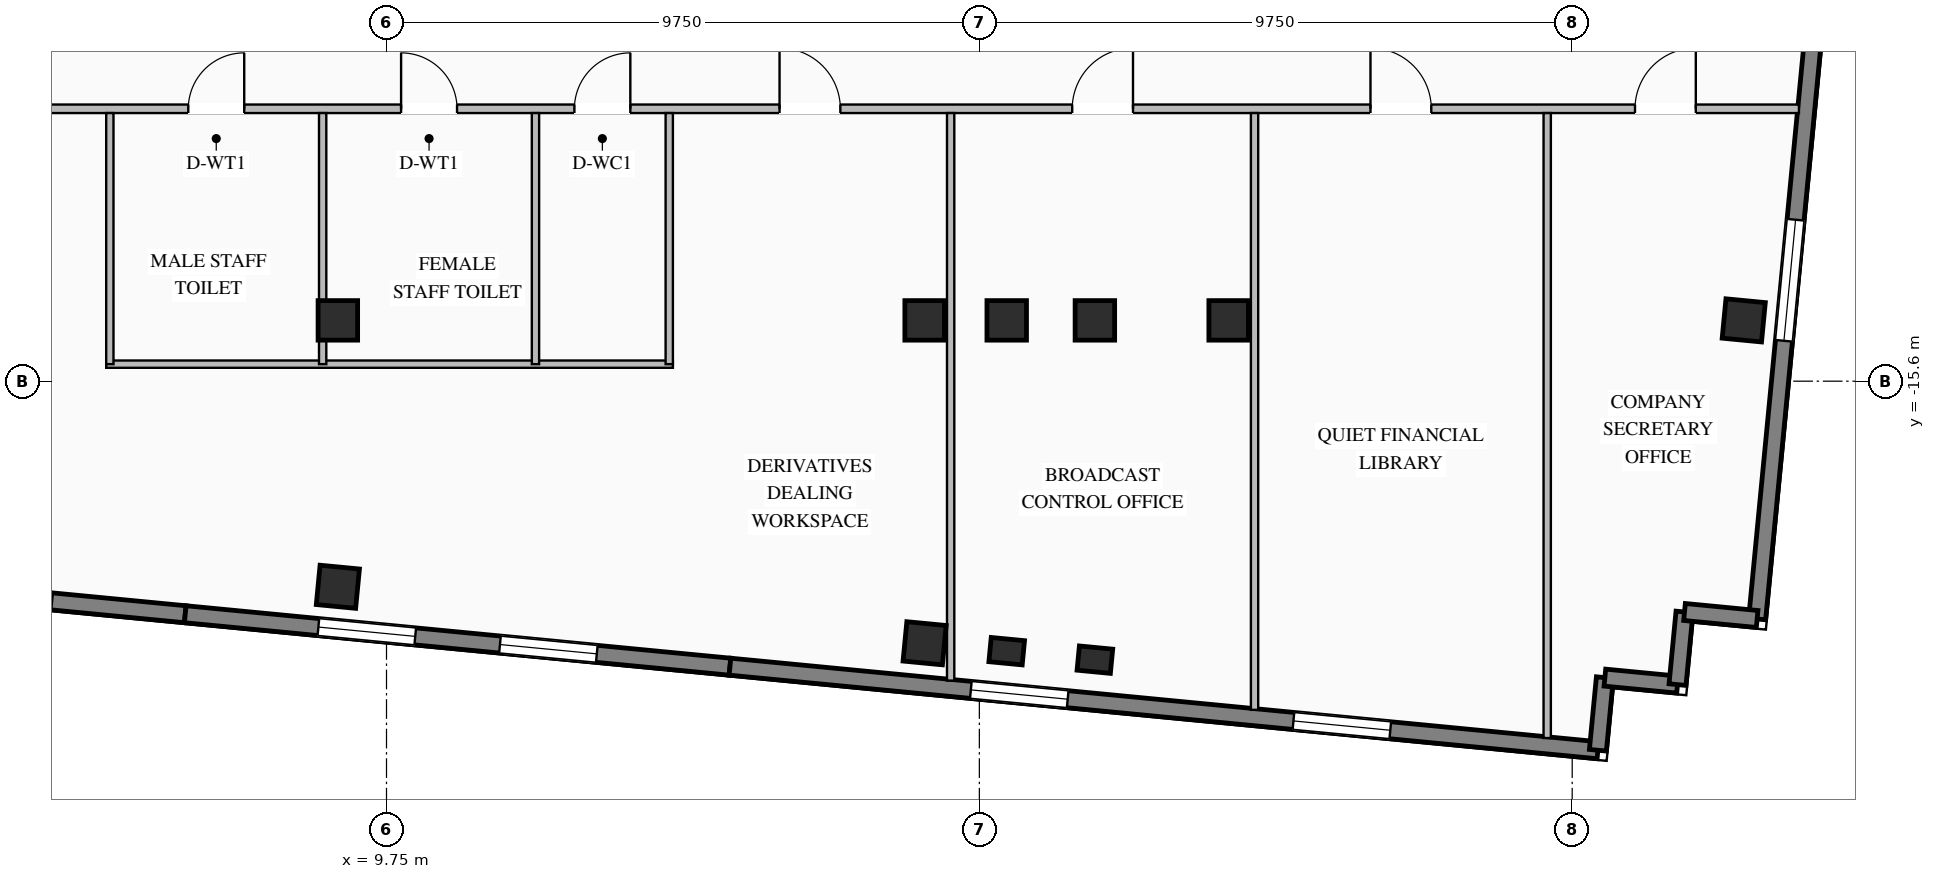
"""IFC4 building model, lengths in metres.
Left out: names, types, materials, properties, quantities, classifications, styles, units other than length and angle.
Written with IfcOpenShell. Run it as: python <this file> out.ifc"""

import sys

from ifc_helpers import new_model, si_unit, direction, frame, frame_2d, origin, origin_2d, place, context, subcontext, project, spatial, rectangle, i_section, extrude, element, fill, save


model = new_model("IFC4")
c1 = context("Model", 3, precision=1e-05, world=origin(), true_north=direction((0.0, 1.0)))
c2 = subcontext(c1, "Body", "Model", "MODEL_VIEW")
j1 = project(units=[si_unit("LENGTHUNIT", "METRE"), si_unit("PLANEANGLEUNIT", "RADIAN")], contexts=[c1])
p1 = place(None, origin())
s1 = spatial("IfcSite", under=j1, at=p1, CompositionType="ELEMENT")
p2 = place(p1, origin())
s2 = spatial("IfcBuilding", under=s1, at=p2, CompositionType="ELEMENT")
p3 = place(p2, frame((0.0, 0.0, 170.75)))
s3 = spatial("IfcBuildingStorey", under=s2, at=p3, CompositionType="ELEMENT", Elevation=170.75)
for number, where, z_axis, x_axis in (
    (1, (8.95, -14.6, 0.0), (0.0, 0.0, 1.0), (1.0, 0.0, 0.0)),
    (2, (18.6, -14.6, 0.0), (0.0, 0.0, 1.0), (1.0, 0.0, 0.0)),
    (3, (19.95, -14.6, 0.0), (0.0, 0.0, 1.0), (1.0, 0.0, 0.0)),
    (4, (21.4, -14.6, 0.0), (0.0, 0.0, 1.0), (1.0, 0.0, 0.0)),
    (5, (23.6, -14.6, 0.0), (0.0, 0.0, 1.0), (1.0, 0.0, 0.0)),
    (6, (8.95, -18.981, 0.0), (0.0, 0.0, 1.0), (0.995, -0.096, 0.0)),
    (7, (18.6, -19.911, 0.0), (0.0, 0.0, 1.0), (0.995, -0.096, 0.0)),
    (8, (32.071, -14.6, 0.0), (0.0, 0.0, 1.0), (0.995, -0.096, 0.0)),
):
    element("IfcColumn", number, at=place(p3, frame(where, z_axis=z_axis, x_axis=x_axis)), inside=s3, PredefinedType="COLUMN", context=c2, shape_type="SweptSolid", body=[
        extrude(i_section(OverallWidth=0.65, OverallDepth=0.65, WebThickness=0.028, FlangeThickness=0.04, at=origin_2d()), origin(), (0.0, 0.0, 1.0), 3.45),
    ])
for number, where, z_axis, x_axis in (
    (9, (19.95, -20.041, 0.0), (0.0, 0.0, 1.0), (0.995, -0.096, 0.0)),
    (10, (21.4, -20.18, 0.0), (0.0, 0.0, 1.0), (0.995, -0.096, 0.0)),
):
    element("IfcColumn", number, at=place(p3, frame(where, z_axis=z_axis, x_axis=x_axis)), inside=s3, PredefinedType="PILASTER", context=c2, shape_type="SweptSolid", body=[
        extrude(rectangle(XDim=0.55, YDim=0.4, at=origin_2d()), origin(), (0.0, 0.0, 1.0), 3.45),
    ])
p4 = place(p3, frame((6.44, -19.433, 0.0), z_axis=(0.0, 0.0, 1.0), x_axis=(-0.995396794462, 0.09583956164, 0.0)))
e11 = element("IfcWall", 11, at=p4, inside=s3, PredefinedType="STANDARD", context=c2, shape_type="SweptSolid", body=[
    extrude(rectangle(XDim=9.0, YDim=0.28, at=frame_2d((4.5, 0.0))), origin(), (0.0, 0.0, 1.0), 3.25),
])
p5 = place(p4, frame((2.2, 0.0, 0.76)))
e12 = element("IfcOpeningElement", 12, at=p5, cuts=e11, PredefinedType="OPENING", context=c2, shape_type="SweptSolid", body=[
    extrude(rectangle(XDim=1.6, YDim=1.95, at=frame_2d((0.8, 0.975))), frame((0.0, 0.15, 0.0), z_axis=(0.0, -1.0, 0.0), x_axis=(1.0, 0.0, 0.0)), (0.0, 0.0, 1.0), 0.3),
])
p6 = place(p4, frame((5.2, 0.0, 0.76)))
e13 = element("IfcOpeningElement", 13, at=p6, cuts=e11, PredefinedType="OPENING", context=c2, shape_type="SweptSolid", body=[
    extrude(rectangle(XDim=1.6, YDim=1.95, at=frame_2d((0.8, 0.975))), frame((0.0, 0.15, 0.0), z_axis=(0.0, -1.0, 0.0), x_axis=(1.0, 0.0, 0.0)), (0.0, 0.0, 1.0), 0.3),
])
p7 = place(p3, frame((15.399, -20.296, 0.0), z_axis=(0.0, 0.0, 1.0), x_axis=(-0.995394455533, 0.09586385082, 0.0)))
e14 = element("IfcWall", 14, at=p7, inside=s3, PredefinedType="STANDARD", context=c2, shape_type="SweptSolid", body=[
    extrude(rectangle(XDim=9.0, YDim=0.28, at=frame_2d((4.5, 0.0))), origin(), (0.0, 0.0, 1.0), 3.25),
])
p8 = place(p7, frame((2.2, 0.0, 0.76)))
e15 = element("IfcOpeningElement", 15, at=p8, cuts=e14, PredefinedType="OPENING", context=c2, shape_type="SweptSolid", body=[
    extrude(rectangle(XDim=1.6, YDim=1.95, at=frame_2d((0.8, 0.975))), frame((0.0, 0.15, 0.0), z_axis=(0.0, -1.0, 0.0), x_axis=(1.0, 0.0, 0.0)), (0.0, 0.0, 1.0), 0.3),
])
p9 = place(p7, frame((5.2, 0.0, 0.76)))
e16 = element("IfcOpeningElement", 16, at=p9, cuts=e14, PredefinedType="OPENING", context=c2, shape_type="SweptSolid", body=[
    extrude(rectangle(XDim=1.6, YDim=1.95, at=frame_2d((0.8, 0.975))), frame((0.0, 0.15, 0.0), z_axis=(0.0, -1.0, 0.0), x_axis=(1.0, 0.0, 0.0)), (0.0, 0.0, 1.0), 0.3),
])
p10 = place(p3, frame((29.673, -21.67, 0.0), z_axis=(0.0, 0.0, 1.0), x_axis=(-0.995397230529, 0.095835032509, 0.0)))
e17 = element("IfcWall", 17, at=p10, inside=s3, PredefinedType="STANDARD", context=c2, shape_type="SweptSolid", body=[
    extrude(rectangle(XDim=14.34, YDim=0.28, at=frame_2d((7.17, 0.0))), origin(), (0.0, 0.0, 1.0), 3.25),
])
p11 = place(p10, frame((3.43, 0.0, 0.76)))
e18 = element("IfcOpeningElement", 18, at=p11, cuts=e17, PredefinedType="OPENING", context=c2, shape_type="SweptSolid", body=[
    extrude(rectangle(XDim=1.6, YDim=1.95, at=frame_2d((0.8, 0.975))), frame((0.0, 0.15, 0.0), z_axis=(0.0, -1.0, 0.0), x_axis=(1.0, 0.0, 0.0)), (0.0, 0.0, 1.0), 0.3),
])
p12 = place(p10, frame((8.76, 0.0, 0.76)))
e19 = element("IfcOpeningElement", 19, at=p12, cuts=e17, PredefinedType="OPENING", context=c2, shape_type="SweptSolid", body=[
    extrude(rectangle(XDim=1.6, YDim=1.95, at=frame_2d((0.8, 0.975))), frame((0.0, 0.15, 0.0), z_axis=(0.0, -1.0, 0.0), x_axis=(1.0, 0.0, 0.0)), (0.0, 0.0, 1.0), 0.3),
])
p13 = place(p3, frame((33.901, -2.798, 0.0), z_axis=(0.0, 0.0, 1.0), x_axis=(-0.095853434568, -0.99539545864, 0.0)))
e20 = element("IfcWall", 20, at=p13, inside=s3, PredefinedType="STANDARD", context=c2, shape_type="SweptSolid", body=[
    extrude(rectangle(XDim=16.79, YDim=0.28, at=frame_2d((8.395, 0.0))), origin(), (0.0, 0.0, 1.0), 3.25),
])
p14 = place(p13, frame((3.547, 0.0, 0.76)))
e21 = element("IfcOpeningElement", 21, at=p14, cuts=e20, PredefinedType="OPENING", context=c2, shape_type="SweptSolid", body=[
    extrude(rectangle(XDim=2.0, YDim=2.05, at=frame_2d((1.0, 1.025))), frame((0.0, 0.15, 0.0), z_axis=(0.0, -1.0, 0.0), x_axis=(1.0, 0.0, 0.0)), (0.0, 0.0, 1.0), 0.3),
])
p15 = place(p13, frame((10.193, 0.0, 0.76)))
e22 = element("IfcOpeningElement", 22, at=p15, cuts=e20, PredefinedType="OPENING", context=c2, shape_type="SweptSolid", body=[
    extrude(rectangle(XDim=2.0, YDim=2.05, at=frame_2d((1.0, 1.025))), frame((0.0, 0.15, 0.0), z_axis=(0.0, -1.0, 0.0), x_axis=(1.0, 0.0, 0.0)), (0.0, 0.0, 1.0), 0.3),
])
for number, where, z_axis, x_axis in (
    (23, (29.673, -21.67, 0.0), (0.0, 0.0, 1.0), (0.096, 0.995, 0.0)),
    (24, (29.788, -20.476, 0.0), (0.0, 0.0, 1.0), (0.995, -0.096, 0.0)),
):
    element("IfcWall", number, at=place(p3, frame(where, z_axis=z_axis, x_axis=x_axis)), inside=s3, PredefinedType="STANDARD", context=c2, shape_type="SweptSolid", body=[
        extrude(rectangle(XDim=1.2, YDim=0.28, at=frame_2d((0.6, 0.0))), origin(), (0.0, 0.0, 1.0), 3.25),
    ])
p16 = place(p3, frame((30.982, -20.591, 0.0), z_axis=(0.0, 0.0, 1.0), x_axis=(0.096018626938, 0.995379537303, 0.0)))
e25 = element("IfcWall", 25, at=p16, inside=s3, PredefinedType="STANDARD", context=c2, shape_type="SweptSolid", body=[
    extrude(rectangle(XDim=1.2, YDim=0.28, at=frame_2d((0.6, 0.0))), origin(), (0.0, 0.0, 1.0), 3.25),
])
p17 = place(p3, frame((31.097, -19.396, 0.0), z_axis=(0.0, 0.0, 1.0), x_axis=(0.995397091755, -0.095836473879, 0.0)))
e26 = element("IfcWall", 26, at=p17, inside=s3, PredefinedType="STANDARD", context=c2, shape_type="SweptSolid", body=[
    extrude(rectangle(XDim=1.2, YDim=0.28, at=frame_2d((0.6, 0.0))), origin(), (0.0, 0.0, 1.0), 3.25),
])
p18 = place(p3, frame((-27.54, -11.12, 0.0), z_axis=(0.0, 0.0, 1.0), x_axis=(1.0, 0.0, 0.0)))
e27 = element("IfcWall", 27, at=p18, inside=s3, PredefinedType="STANDARD", context=c2, shape_type="SweptSolid", body=[
    extrude(rectangle(XDim=60.519, YDim=0.14, at=frame_2d((30.259, 0.0))), origin(), (0.0, 0.0, 1.0), 3.25),
])
p19 = place(p18, frame((34.03, 0.0, 0.0)))
e28 = element("IfcOpeningElement", 28, at=p19, cuts=e27, PredefinedType="OPENING", context=c2, shape_type="SweptSolid", body=[
    extrude(rectangle(XDim=0.92, YDim=2.08, at=frame_2d((0.46, 1.04))), frame((0.0, 0.08, 0.0), z_axis=(0.0, -1.0, 0.0), x_axis=(1.0, 0.0, 0.0)), (0.0, 0.0, 1.0), 0.16),
])
p20 = place(p18, frame((37.53, 0.0, 0.0)))
e29 = element("IfcOpeningElement", 29, at=p20, cuts=e27, PredefinedType="OPENING", context=c2, shape_type="SweptSolid", body=[
    extrude(rectangle(XDim=0.92, YDim=2.08, at=frame_2d((0.46, 1.04))), frame((0.0, 0.08, 0.0), z_axis=(0.0, -1.0, 0.0), x_axis=(1.0, 0.0, 0.0)), (0.0, 0.0, 1.0), 0.16),
])
p21 = place(p18, frame((40.38, 0.0, 0.0)))
e30 = element("IfcOpeningElement", 30, at=p21, cuts=e27, PredefinedType="OPENING", context=c2, shape_type="SweptSolid", body=[
    extrude(rectangle(XDim=0.92, YDim=2.08, at=frame_2d((0.46, 1.04))), frame((0.0, 0.08, 0.0), z_axis=(0.0, -1.0, 0.0), x_axis=(1.0, 0.0, 0.0)), (0.0, 0.0, 1.0), 0.16),
])
p22 = place(p18, frame((3.653, 0.0, 0.0)))
e31 = element("IfcOpeningElement", 31, at=p22, cuts=e27, PredefinedType="OPENING", context=c2, shape_type="SweptSolid", body=[
    extrude(rectangle(XDim=1.0, YDim=2.08, at=frame_2d((0.5, 1.04))), frame((0.0, 0.08, 0.0), z_axis=(0.0, -1.0, 0.0), x_axis=(1.0, 0.0, 0.0)), (0.0, 0.0, 1.0), 0.16),
])
p23 = place(p18, frame((11.998, 0.0, 0.0)))
e32 = element("IfcOpeningElement", 32, at=p23, cuts=e27, PredefinedType="OPENING", context=c2, shape_type="SweptSolid", body=[
    extrude(rectangle(XDim=1.0, YDim=2.08, at=frame_2d((0.5, 1.04))), frame((0.0, 0.08, 0.0), z_axis=(0.0, -1.0, 0.0), x_axis=(1.0, 0.0, 0.0)), (0.0, 0.0, 1.0), 0.16),
])
p24 = place(p18, frame((20.72, 0.0, 0.0)))
e33 = element("IfcOpeningElement", 33, at=p24, cuts=e27, PredefinedType="OPENING", context=c2, shape_type="SweptSolid", body=[
    extrude(rectangle(XDim=1.0, YDim=2.08, at=frame_2d((0.5, 1.04))), frame((0.0, 0.08, 0.0), z_axis=(0.0, -1.0, 0.0), x_axis=(1.0, 0.0, 0.0)), (0.0, 0.0, 1.0), 0.16),
])
p25 = place(p18, frame((28.619, 0.0, 0.0)))
e34 = element("IfcOpeningElement", 34, at=p25, cuts=e27, PredefinedType="OPENING", context=c2, shape_type="SweptSolid", body=[
    extrude(rectangle(XDim=1.0, YDim=2.08, at=frame_2d((0.5, 1.04))), frame((0.0, 0.08, 0.0), z_axis=(0.0, -1.0, 0.0), x_axis=(1.0, 0.0, 0.0)), (0.0, 0.0, 1.0), 0.16),
])
p26 = place(p18, frame((43.754, 0.0, 0.0)))
e35 = element("IfcOpeningElement", 35, at=p26, cuts=e27, PredefinedType="OPENING", context=c2, shape_type="SweptSolid", body=[
    extrude(rectangle(XDim=1.0, YDim=2.08, at=frame_2d((0.5, 1.04))), frame((0.0, 0.08, 0.0), z_axis=(0.0, -1.0, 0.0), x_axis=(1.0, 0.0, 0.0)), (0.0, 0.0, 1.0), 0.16),
])
p27 = place(p18, frame((48.567, 0.0, 0.0)))
e36 = element("IfcOpeningElement", 36, at=p27, cuts=e27, PredefinedType="OPENING", context=c2, shape_type="SweptSolid", body=[
    extrude(rectangle(XDim=1.0, YDim=2.08, at=frame_2d((0.5, 1.04))), frame((0.0, 0.08, 0.0), z_axis=(0.0, -1.0, 0.0), x_axis=(1.0, 0.0, 0.0)), (0.0, 0.0, 1.0), 0.16),
])
p28 = place(p18, frame((53.472, 0.0, 0.0)))
e37 = element("IfcOpeningElement", 37, at=p28, cuts=e27, PredefinedType="OPENING", context=c2, shape_type="SweptSolid", body=[
    extrude(rectangle(XDim=1.0, YDim=2.08, at=frame_2d((0.5, 1.04))), frame((0.0, 0.08, 0.0), z_axis=(0.0, -1.0, 0.0), x_axis=(1.0, 0.0, 0.0)), (0.0, 0.0, 1.0), 0.16),
])
p29 = place(p18, frame((57.823, 0.0, 0.0)))
e38 = element("IfcOpeningElement", 38, at=p29, cuts=e27, PredefinedType="OPENING", context=c2, shape_type="SweptSolid", body=[
    extrude(rectangle(XDim=1.0, YDim=2.08, at=frame_2d((0.5, 1.04))), frame((0.0, 0.08, 0.0), z_axis=(0.0, -1.0, 0.0), x_axis=(1.0, 0.0, 0.0)), (0.0, 0.0, 1.0), 0.16),
])
p30 = place(p3, frame((5.14, -15.32, 0.0), z_axis=(0.0, 0.0, 1.0), x_axis=(1.0, 0.0, 0.0)))
e39 = element("IfcWall", 39, at=p30, inside=s3, PredefinedType="STANDARD", context=c2, shape_type="SweptSolid", body=[
    extrude(rectangle(XDim=9.32, YDim=0.12, at=frame_2d((4.66, 0.0))), origin(), (0.0, 0.0, 1.0), 3.25),
])
for number, where, z_axis, x_axis in (
    (40, (5.2, -15.32, 0.0), (0.0, 0.0, 1.0), (0.0, 1.0, 0.0)),
    (41, (8.7, -15.32, 0.0), (0.0, 0.0, 1.0), (0.0, 1.0, 0.0)),
    (42, (12.2, -15.32, 0.0), (0.0, 0.0, 1.0), (0.0, 1.0, 0.0)),
    (43, (14.4, -15.32, 0.0), (0.0, 0.0, 1.0), (0.0, 1.0, 0.0)),
):
    element("IfcWall", number, at=place(p3, frame(where, z_axis=z_axis, x_axis=x_axis)), inside=s3, PredefinedType="STANDARD", context=c2, shape_type="SweptSolid", body=[
        extrude(rectangle(XDim=4.13, YDim=0.12, at=frame_2d((2.065, 0.0))), origin(), (0.0, 0.0, 1.0), 3.25),
    ])
p31 = place(p3, frame((19.028, -20.524, 0.0), z_axis=(0.0, 0.0, 1.0), x_axis=(0.0, 1.0, 0.0)))
e44 = element("IfcWall", 44, at=p31, inside=s3, PredefinedType="STANDARD", context=c2, shape_type="SweptSolid", body=[
    extrude(rectangle(XDim=9.334, YDim=0.12, at=frame_2d((4.667, 0.0))), origin(), (0.0, 0.0, 1.0), 3.25),
])
p32 = place(p3, frame((24.026, -21.006, 0.0), z_axis=(0.0, 0.0, 1.0), x_axis=(0.0, 1.0, 0.0)))
e45 = element("IfcWall", 45, at=p32, inside=s3, PredefinedType="STANDARD", context=c2, shape_type="SweptSolid", body=[
    extrude(rectangle(XDim=9.816, YDim=0.12, at=frame_2d((4.908, 0.0))), origin(), (0.0, 0.0, 1.0), 3.25),
])
p33 = place(p3, frame((28.839, -21.469, 0.0), z_axis=(0.0, 0.0, 1.0), x_axis=(0.0, 1.0, 0.0)))
e46 = element("IfcWall", 46, at=p33, inside=s3, PredefinedType="STANDARD", context=c2, shape_type="SweptSolid", body=[
    extrude(rectangle(XDim=10.279, YDim=0.12, at=frame_2d((5.14, 0.0))), origin(), (0.0, 0.0, 1.0), 3.25),
])
p34 = place(p8, origin())
e47 = element("IfcWindow", 47, at=p34, inside=s3, PartitioningType="SINGLE_PANEL", PredefinedType="WINDOW", context=c2, shape_type="SweptSolid", body=[
    extrude(rectangle(XDim=1.6, YDim=1.95, at=frame_2d((0.8, 0.975))), frame((0.0, 0.03, 0.0), z_axis=(0.0, -1.0, 0.0), x_axis=(1.0, 0.0, 0.0)), (0.0, 0.0, 1.0), 0.06),
])
fill(e15, e47)
p35 = place(p9, origin())
e48 = element("IfcWindow", 48, at=p35, inside=s3, PartitioningType="SINGLE_PANEL", PredefinedType="WINDOW", context=c2, shape_type="SweptSolid", body=[
    extrude(rectangle(XDim=1.6, YDim=1.95, at=frame_2d((0.8, 0.975))), frame((0.0, 0.03, 0.0), z_axis=(0.0, -1.0, 0.0), x_axis=(1.0, 0.0, 0.0)), (0.0, 0.0, 1.0), 0.06),
])
fill(e16, e48)
p36 = place(p11, origin())
e49 = element("IfcWindow", 49, at=p36, inside=s3, PartitioningType="SINGLE_PANEL", PredefinedType="WINDOW", context=c2, shape_type="SweptSolid", body=[
    extrude(rectangle(XDim=1.6, YDim=1.95, at=frame_2d((0.8, 0.975))), frame((0.0, 0.03, 0.0), z_axis=(0.0, -1.0, 0.0), x_axis=(1.0, 0.0, 0.0)), (0.0, 0.0, 1.0), 0.06),
])
fill(e18, e49)
p37 = place(p12, origin())
e50 = element("IfcWindow", 50, at=p37, inside=s3, PartitioningType="SINGLE_PANEL", PredefinedType="WINDOW", context=c2, shape_type="SweptSolid", body=[
    extrude(rectangle(XDim=1.6, YDim=1.95, at=frame_2d((0.8, 0.975))), frame((0.0, 0.03, 0.0), z_axis=(0.0, -1.0, 0.0), x_axis=(1.0, 0.0, 0.0)), (0.0, 0.0, 1.0), 0.06),
])
fill(e19, e50)
p38 = place(p15, origin())
e51 = element("IfcWindow", 51, at=p38, inside=s3, PartitioningType="DOUBLE_PANEL_VERTICAL", PredefinedType="WINDOW", context=c2, shape_type="SweptSolid", body=[
    extrude(rectangle(XDim=2.0, YDim=2.05, at=frame_2d((1.0, 1.025))), frame((0.0, 0.03, 0.0), z_axis=(0.0, -1.0, 0.0), x_axis=(1.0, 0.0, 0.0)), (0.0, 0.0, 1.0), 0.06),
])
fill(e22, e51)
p39 = place(p19, origin())
e52 = element("IfcDoor", 52, at=p39, inside=s3, OperationType="SINGLE_SWING_RIGHT", PredefinedType="DOOR", context=c2, shape_type="SweptSolid", body=[
    extrude(rectangle(XDim=0.92, YDim=2.08, at=frame_2d((0.46, 1.04))), frame((0.0, 0.025, 0.0), z_axis=(0.0, -1.0, 0.0), x_axis=(1.0, 0.0, 0.0)), (0.0, 0.0, 1.0), 0.05),
])
fill(e28, e52)
p40 = place(p20, origin())
e53 = element("IfcDoor", 53, at=p40, inside=s3, OperationType="SINGLE_SWING_LEFT", PredefinedType="DOOR", context=c2, shape_type="SweptSolid", body=[
    extrude(rectangle(XDim=0.92, YDim=2.08, at=frame_2d((0.46, 1.04))), frame((0.0, 0.025, 0.0), z_axis=(0.0, -1.0, 0.0), x_axis=(1.0, 0.0, 0.0)), (0.0, 0.0, 1.0), 0.05),
])
fill(e29, e53)
p41 = place(p21, origin())
e54 = element("IfcDoor", 54, at=p41, inside=s3, OperationType="SINGLE_SWING_RIGHT", PredefinedType="DOOR", context=c2, shape_type="SweptSolid", body=[
    extrude(rectangle(XDim=0.92, YDim=2.08, at=frame_2d((0.46, 1.04))), frame((0.0, 0.025, 0.0), z_axis=(0.0, -1.0, 0.0), x_axis=(1.0, 0.0, 0.0)), (0.0, 0.0, 1.0), 0.05),
])
fill(e30, e54)
p42 = place(p26, origin())
e55 = element("IfcDoor", 55, at=p42, inside=s3, OperationType="SINGLE_SWING_LEFT", PredefinedType="DOOR", context=c2, shape_type="SweptSolid", body=[
    extrude(rectangle(XDim=1.0, YDim=2.08, at=frame_2d((0.5, 1.04))), frame((0.0, 0.025, 0.0), z_axis=(0.0, -1.0, 0.0), x_axis=(1.0, 0.0, 0.0)), (0.0, 0.0, 1.0), 0.05),
])
fill(e35, e55)
p43 = place(p27, origin())
e56 = element("IfcDoor", 56, at=p43, inside=s3, OperationType="SINGLE_SWING_RIGHT", PredefinedType="DOOR", context=c2, shape_type="SweptSolid", body=[
    extrude(rectangle(XDim=1.0, YDim=2.08, at=frame_2d((0.5, 1.04))), frame((0.0, 0.025, 0.0), z_axis=(0.0, -1.0, 0.0), x_axis=(1.0, 0.0, 0.0)), (0.0, 0.0, 1.0), 0.05),
])
fill(e36, e56)
p44 = place(p28, origin())
e57 = element("IfcDoor", 57, at=p44, inside=s3, OperationType="SINGLE_SWING_LEFT", PredefinedType="DOOR", context=c2, shape_type="SweptSolid", body=[
    extrude(rectangle(XDim=1.0, YDim=2.08, at=frame_2d((0.5, 1.04))), frame((0.0, 0.025, 0.0), z_axis=(0.0, -1.0, 0.0), x_axis=(1.0, 0.0, 0.0)), (0.0, 0.0, 1.0), 0.05),
])
fill(e37, e57)
p45 = place(p29, origin())
e58 = element("IfcDoor", 58, at=p45, inside=s3, OperationType="SINGLE_SWING_RIGHT", PredefinedType="DOOR", context=c2, shape_type="SweptSolid", body=[
    extrude(rectangle(XDim=1.0, YDim=2.08, at=frame_2d((0.5, 1.04))), frame((0.0, 0.025, 0.0), z_axis=(0.0, -1.0, 0.0), x_axis=(1.0, 0.0, 0.0)), (0.0, 0.0, 1.0), 0.05),
])
fill(e38, e58)
save(model, sys.argv[1])
